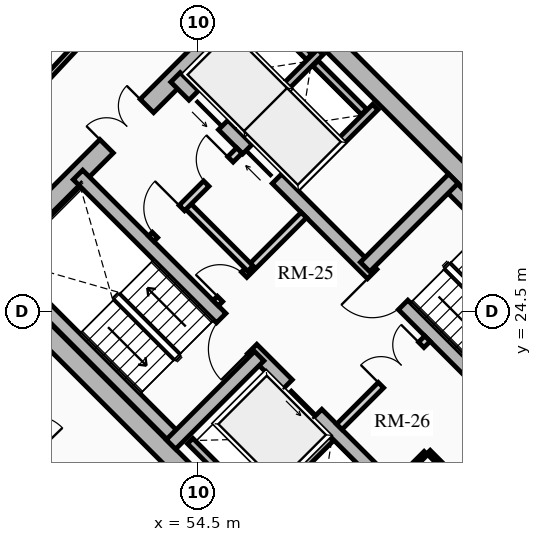
"""IFC4 building model, lengths in metres.
Left out: names, types, materials, properties, quantities, classifications, styles, units other than length and angle.
Written with IfcOpenShell. Run it as: python <this file> out.ifc"""

import sys

from ifc_helpers import new_model, si_unit, direction, frame, frame_2d, origin, place, context, subcontext, project, spatial, rectangle, extrude, source, transform, mapped, element, fill, save


model = new_model("IFC4")
c1 = context("Model", 3, precision=1e-05, world=origin(), true_north=direction((0.0, 1.0)))
c2 = subcontext(c1, "Body", "Model", "MODEL_VIEW")
j1 = project(units=[si_unit("LENGTHUNIT", "METRE"), si_unit("PLANEANGLEUNIT", "RADIAN")], contexts=[c1])
p1 = place(None, origin())
s1 = spatial("IfcSite", under=j1, at=p1, CompositionType="ELEMENT")
p2 = place(p1, origin())
s2 = spatial("IfcBuilding", under=s1, at=p2, CompositionType="ELEMENT")
p3 = place(p2, frame((0.0, 0.0, 39.46)))
s3 = spatial("IfcBuildingStorey", under=s2, at=p3, CompositionType="ELEMENT", Elevation=39.46)
for number, where, z_axis, x_axis in (
    (1, (58.773, 15.661, 0.0), (0.0, 0.0, 1.0), (-0.707, 0.707, 0.0)),
    (2, (66.339, 23.227, 0.0), (0.0, 0.0, 1.0), (-0.707, 0.707, 0.0)),
):
    element("IfcWall", number, at=place(p3, frame(where, z_axis=z_axis, x_axis=x_axis)), inside=s3, PredefinedType="SHEAR", context=c2, shape_type="SweptSolid", body=[
        extrude(rectangle(XDim=14.3, YDim=0.5, at=frame_2d((7.15, 0.0))), origin(), (0.0, 0.0, 1.0), 2.91),
    ])
p4 = place(p3, frame((58.596, 15.838, 0.0), z_axis=(0.0, 0.0, 1.0), x_axis=(0.707106781187, 0.707106781187, 0.0)))
e3 = element("IfcWall", 3, at=p4, inside=s3, PredefinedType="SHEAR", context=c2, shape_type="SweptSolid", body=[
    extrude(rectangle(XDim=10.7, YDim=0.5, at=frame_2d((5.35, 0.0))), origin(), (0.0, 0.0, 1.0), 2.91),
])
m1 = source(origin(), c2, "Body", "SweptSolid", [
    extrude(rectangle(XDim=1.5, YDim=2.02, at=frame_2d((0.75, 1.01))), frame((0.0, 0.26, 0.0), z_axis=(0.0, -1.0, 0.0), x_axis=(1.0, 0.0, 0.0)), (0.0, 0.0, 1.0), 0.52),
])
p5 = place(p4, frame((5.45, 0.0, 0.0)))
e4 = element("IfcOpeningElement", 4, at=p5, cuts=e3, PredefinedType="OPENING", context=c2, shape_type="MappedRepresentation", body=[
    mapped(m1, transform((0.0, 0.0, 0.0), x_axis=(1.0, 0.0, 0.0), y_axis=(0.0, 1.0, 0.0), z_axis=(0.0, 0.0, 1.0), scale=1.0)),
])
p6 = place(p3, frame((48.838, 25.596, 0.0), z_axis=(0.0, 0.0, 1.0), x_axis=(0.707106781187, 0.707106781187, 0.0)))
e5 = element("IfcWall", 5, at=p6, inside=s3, PredefinedType="SHEAR", context=c2, shape_type="SweptSolid", body=[
    extrude(rectangle(XDim=10.7, YDim=0.5, at=frame_2d((5.35, 0.0))), origin(), (0.0, 0.0, 1.0), 2.91),
])
p7 = place(p6, frame((4.6, 0.0, 0.0)))
e6 = element("IfcOpeningElement", 6, at=p7, cuts=e5, PredefinedType="OPENING", context=c2, shape_type="MappedRepresentation", body=[
    mapped(m1, transform((0.0, 0.0, 0.0), x_axis=(1.0, 0.0, 0.0), y_axis=(0.0, 1.0, 0.0), z_axis=(0.0, 0.0, 1.0), scale=1.0)),
])
p8 = place(p3, frame((61.096, 18.338, 0.0), z_axis=(0.0, 0.0, 1.0), x_axis=(-0.707106781187, 0.707106781187, 0.0)))
e7 = element("IfcWall", 7, at=p8, inside=s3, PredefinedType="SHEAR", context=c2, shape_type="SweptSolid", body=[
    extrude(rectangle(XDim=13.8, YDim=0.35, at=frame_2d((6.9, 0.0))), origin(), (0.0, 0.0, 1.0), 2.91),
])
m2 = source(origin(), c2, "Body", "SweptSolid", [
    extrude(rectangle(XDim=1.1, YDim=2.015, at=frame_2d((0.55, 1.007))), frame((0.0, 0.185, 0.0), z_axis=(0.0, -1.0, 0.0), x_axis=(1.0, 0.0, 0.0)), (0.0, 0.0, 1.0), 0.37),
])
p9 = place(p8, frame((4.9, 0.0, 0.0)))
e8 = element("IfcOpeningElement", 8, at=p9, cuts=e7, PredefinedType="OPENING", context=c2, shape_type="MappedRepresentation", body=[
    mapped(m2, transform((0.0, 0.0, 0.0), x_axis=(1.0, 0.0, 0.0), y_axis=(0.0, 1.0, 0.0), z_axis=(0.0, 0.0, 1.0), scale=1.0)),
])
m3 = source(origin(), c2, "Body", "SweptSolid", [
    extrude(rectangle(XDim=1.15, YDim=2.02, at=frame_2d((0.575, 1.01))), frame((0.0, 0.185, 0.0), z_axis=(0.0, -1.0, 0.0), x_axis=(1.0, 0.0, 0.0)), (0.0, 0.0, 1.0), 0.37),
])
p10 = place(p8, frame((7.32, 0.0, 0.0)))
e9 = element("IfcOpeningElement", 9, at=p10, cuts=e7, PredefinedType="OPENING", context=c2, shape_type="MappedRepresentation", body=[
    mapped(m3, transform((0.0, 0.0, 0.0), x_axis=(1.0, 0.0, 0.0), y_axis=(0.0, 1.0, 0.0), z_axis=(0.0, 0.0, 1.0), scale=1.0)),
])
p11 = place(p3, frame((63.662, 20.904, 0.0), z_axis=(0.0, 0.0, 1.0), x_axis=(-0.707106781187, 0.707106781187, 0.0)))
e10 = element("IfcWall", 10, at=p11, inside=s3, PredefinedType="SHEAR", context=c2, shape_type="SweptSolid", body=[
    extrude(rectangle(XDim=13.8, YDim=0.35, at=frame_2d((6.9, 0.0))), origin(), (0.0, 0.0, 1.0), 2.91),
])
p12 = place(p11, frame((10.025, 0.0, 0.0)))
e11 = element("IfcOpeningElement", 11, at=p12, cuts=e10, PredefinedType="OPENING", context=c2, shape_type="MappedRepresentation", body=[
    mapped(m2, transform((0.0, 0.0, 0.0), x_axis=(1.0, 0.0, 0.0), y_axis=(0.0, 1.0, 0.0), z_axis=(0.0, 0.0, 1.0), scale=1.0)),
])
p13 = place(p11, frame((12.025, 0.0, 0.0)))
e12 = element("IfcOpeningElement", 12, at=p13, cuts=e10, PredefinedType="OPENING", context=c2, shape_type="MappedRepresentation", body=[
    mapped(m2, transform((0.0, 0.0, 0.0), x_axis=(1.0, 0.0, 0.0), y_axis=(0.0, 1.0, 0.0), z_axis=(0.0, 0.0, 1.0), scale=1.0)),
])
p14 = place(p11, frame((5.33, 0.0, 0.0)))
e13 = element("IfcOpeningElement", 13, at=p14, cuts=e10, PredefinedType="OPENING", context=c2, shape_type="MappedRepresentation", body=[
    mapped(m3, transform((0.0, 0.0, 0.0), x_axis=(1.0, 0.0, 0.0), y_axis=(0.0, 1.0, 0.0), z_axis=(0.0, 0.0, 1.0), scale=1.0)),
])
p15 = place(p3, frame((53.922, 21.141, 0.0), z_axis=(0.0, 0.0, 1.0), x_axis=(-0.707106781187, 0.707106781187, 0.0)))
e14 = element("IfcWall", 14, at=p15, inside=s3, PredefinedType="SHEAR", context=c2, shape_type="SweptSolid", body=[
    extrude(rectangle(XDim=6.745, YDim=0.35, at=frame_2d((3.373, 0.0))), origin(), (0.0, 0.0, 1.0), 2.91),
])
p16 = place(p3, frame((53.784, 21.003, 0.0), z_axis=(0.0, 0.0, 1.0), x_axis=(0.707106781187, 0.707106781187, 0.0)))
e15 = element("IfcWall", 15, at=p16, inside=s3, PredefinedType="SHEAR", context=c2, shape_type="SweptSolid", body=[
    extrude(rectangle(XDim=3.285, YDim=0.35, at=frame_2d((1.643, 0.0))), origin(), (0.0, 0.0, 1.0), 2.91),
])
p17 = place(p3, frame((65.847, 23.089, 0.0), z_axis=(0.0, 0.0, 1.0), x_axis=(-0.707106781187, 0.707106781187, 0.0)))
e16 = element("IfcWall", 16, at=p17, inside=s3, PredefinedType="SHEAR", context=c2, shape_type="SweptSolid", body=[
    extrude(rectangle(XDim=6.745, YDim=0.35, at=frame_2d((3.373, 0.0))), origin(), (0.0, 0.0, 1.0), 2.91),
])
p18 = place(p3, frame((58.893, 25.674, 0.0), z_axis=(0.0, 0.0, 1.0), x_axis=(0.707106781187, 0.707106781187, 0.0)))
e17 = element("IfcWall", 17, at=p18, inside=s3, PredefinedType="SHEAR", context=c2, shape_type="SweptSolid", body=[
    extrude(rectangle(XDim=3.285, YDim=0.35, at=frame_2d((1.643, 0.0))), origin(), (0.0, 0.0, 1.0), 2.91),
])
p19 = place(p3, frame((55.888, 19.069, 0.0), z_axis=(0.0, 0.0, 1.0), x_axis=(0.707106781187, 0.707106781187, 0.0)))
e18 = element("IfcWall", 18, at=p19, inside=s3, PredefinedType="SHEAR", context=c2, shape_type="SweptSolid", body=[
    extrude(rectangle(XDim=2.97, YDim=0.2, at=frame_2d((1.485, 0.0))), origin(), (0.0, 0.0, 1.0), 2.91),
])
p20 = place(p3, frame((56.015, 19.366, 0.0), z_axis=(0.0, 0.0, 1.0), x_axis=(-0.707106781187, 0.707106781187, 0.0)))
e19 = element("IfcWall", 19, at=p20, inside=s3, PredefinedType="SHEAR", context=c2, shape_type="SweptSolid", body=[
    extrude(rectangle(XDim=2.44, YDim=0.2, at=frame_2d((1.22, 0.0))), origin(), (0.0, 0.0, 1.0), 2.91),
])
p21 = place(p3, frame((57.062, 27.781, 0.0), z_axis=(0.0, 0.0, 1.0), x_axis=(0.707106781187, 0.707106781187, 0.0)))
e20 = element("IfcWall", 20, at=p21, inside=s3, PredefinedType="SHEAR", context=c2, shape_type="SweptSolid", body=[
    extrude(rectangle(XDim=2.97, YDim=0.2, at=frame_2d((1.485, 0.0))), origin(), (0.0, 0.0, 1.0), 2.91),
])
p22 = place(p3, frame((55.615, 29.227, 0.0), z_axis=(0.0, 0.0, 1.0), x_axis=(0.707147878904, 0.70706568108, 0.0)))
e21 = element("IfcWall", 21, at=p22, inside=s3, PredefinedType="SHEAR", context=c2, shape_type="SweptSolid", body=[
    extrude(rectangle(XDim=2.97, YDim=0.2, at=frame_2d((1.485, 0.0))), origin(), (0.0, 0.0, 1.0), 2.91),
])
p23 = place(p3, frame((58.865, 29.754, 0.0), z_axis=(0.0, 0.0, 1.0), x_axis=(-0.707174411312, 0.707039144592, 0.0)))
e22 = element("IfcWall", 22, at=p23, inside=s3, PredefinedType="SHEAR", context=c2, shape_type="SweptSolid", body=[
    extrude(rectangle(XDim=1.805, YDim=0.2, at=frame_2d((0.902, 0.0))), origin(), (0.0, 0.0, 1.0), 2.91),
])
p24 = place(p3, frame((57.419, 31.2, 0.0), z_axis=(0.0, 0.0, 1.0), x_axis=(-0.707032117043, 0.707181437447, 0.0)))
e23 = element("IfcWall", 23, at=p24, inside=s3, PredefinedType="SHEAR", context=c2, shape_type="SweptSolid", body=[
    extrude(rectangle(XDim=1.635, YDim=0.2, at=frame_2d((0.817, 0.0))), origin(), (0.0, 0.0, 1.0), 2.91),
])
p25 = place(p3, frame((58.214, 21.467, 0.0), z_axis=(0.0, 0.0, 1.0), x_axis=(0.707106781187, 0.707106781187, 0.0)))
e24 = element("IfcWall", 24, at=p25, inside=s3, PredefinedType="PARTITIONING", context=c2, shape_type="SweptSolid", body=[
    extrude(rectangle(XDim=3.28, YDim=0.2, at=frame_2d((1.64, 0.0))), origin(), (0.0, 0.0, 1.0), 2.635),
])
m4 = source(origin(), c2, "Body", "SweptSolid", [
    extrude(rectangle(XDim=1.5, YDim=2.02, at=frame_2d((0.75, 1.01))), frame((0.0, 0.11, 0.0), z_axis=(0.0, -1.0, 0.0), x_axis=(1.0, 0.0, 0.0)), (0.0, 0.0, 1.0), 0.22),
])
p26 = place(p25, frame((1.55, 0.0, 0.0)))
e25 = element("IfcOpeningElement", 25, at=p26, cuts=e24, PredefinedType="OPENING", context=c2, shape_type="MappedRepresentation", body=[
    mapped(m4, transform((0.0, 0.0, 0.0), x_axis=(1.0, 0.0, 0.0), y_axis=(0.0, 1.0, 0.0), z_axis=(0.0, 0.0, 1.0), scale=1.0)),
])
p27 = place(p3, frame((54.961, 24.719, 0.0), z_axis=(0.0, 0.0, 1.0), x_axis=(0.707106781187, 0.707106781187, 0.0)))
e26 = element("IfcWall", 26, at=p27, inside=s3, PredefinedType="PARTITIONING", context=c2, shape_type="SweptSolid", body=[
    extrude(rectangle(XDim=3.28, YDim=0.2, at=frame_2d((1.64, 0.0))), origin(), (0.0, 0.0, 1.0), 2.635),
])
m5 = source(origin(), c2, "Body", "SweptSolid", [
    extrude(rectangle(XDim=0.9, YDim=2.005, at=frame_2d((0.45, 1.002))), frame((0.0, 0.11, 0.0), z_axis=(0.0, -1.0, 0.0), x_axis=(1.0, 0.0, 0.0)), (0.0, 0.0, 1.0), 0.22),
])
p28 = place(p27, frame((0.16, 0.0, 0.0)))
e27 = element("IfcOpeningElement", 27, at=p28, cuts=e26, PredefinedType="OPENING", context=c2, shape_type="MappedRepresentation", body=[
    mapped(m5, transform((0.0, 0.0, 0.0), x_axis=(1.0, 0.0, 0.0), y_axis=(0.0, 1.0, 0.0), z_axis=(0.0, 0.0, 1.0), scale=1.0)),
])
p29 = place(p3, frame((55.874, 25.631, 0.0), z_axis=(0.0, 0.0, 1.0), x_axis=(-0.707157639372, 0.707055919343, 0.0)))
e28 = element("IfcWall", 28, at=p29, inside=s3, PredefinedType="PARTITIONING", context=c2, shape_type="SweptSolid", body=[
    extrude(rectangle(XDim=2.4, YDim=0.2, at=frame_2d((1.2, 0.0))), origin(), (0.0, 0.0, 1.0), 2.635),
])
p30 = place(p3, frame((53.264, 26.416, 0.0), z_axis=(0.0, 0.0, 1.0), x_axis=(0.707106781187, 0.707106781187, 0.0)))
e29 = element("IfcWall", 29, at=p30, inside=s3, PredefinedType="PARTITIONING", context=c2, shape_type="SweptSolid", body=[
    extrude(rectangle(XDim=3.28, YDim=0.2, at=frame_2d((1.64, 0.0))), origin(), (0.0, 0.0, 1.0), 2.635),
])
m6 = source(origin(), c2, "Body", "SweptSolid", [
    extrude(rectangle(XDim=1.0, YDim=2.015, at=frame_2d((0.5, 1.007))), frame((0.0, 0.11, 0.0), z_axis=(0.0, -1.0, 0.0), x_axis=(1.0, 0.0, 0.0)), (0.0, 0.0, 1.0), 0.22),
])
p31 = place(p30, frame((0.14, 0.0, 0.0)))
e30 = element("IfcOpeningElement", 30, at=p31, cuts=e29, PredefinedType="OPENING", context=c2, shape_type="MappedRepresentation", body=[
    mapped(m6, transform((0.0, 0.0, 0.0), x_axis=(1.0, 0.0, 0.0), y_axis=(0.0, 1.0, 0.0), z_axis=(0.0, 0.0, 1.0), scale=1.0)),
])
p32 = place(p30, frame((2.05, 0.0, 0.0)))
e31 = element("IfcOpeningElement", 31, at=p32, cuts=e29, PredefinedType="OPENING", context=c2, shape_type="MappedRepresentation", body=[
    mapped(m5, transform((0.0, 0.0, 0.0), x_axis=(1.0, 0.0, 0.0), y_axis=(0.0, 1.0, 0.0), z_axis=(0.0, 0.0, 1.0), scale=1.0)),
])
p33 = place(p3, frame((61.835, 19.529, 0.0), z_axis=(0.0, 0.0, 1.0), x_axis=(-0.707174592913, 0.707038962956, 0.0)))
e32 = element("IfcWall", 32, at=p33, inside=s3, PredefinedType="PARTITIONING", context=c2, shape_type="SweptSolid", body=[
    extrude(rectangle(XDim=1.8, YDim=0.125, at=frame_2d((0.9, 0.0))), origin(), (0.0, 0.0, 1.0), 2.635),
])
m7 = source(origin(), c2, "Body", "SweptSolid", [
    extrude(rectangle(XDim=0.9, YDim=2.005, at=frame_2d((0.45, 1.002))), frame((0.0, 0.073, 0.0), z_axis=(0.0, -1.0, 0.0), x_axis=(1.0, 0.0, 0.0)), (0.0, 0.0, 1.0), 0.145),
])
p34 = place(p33, frame((0.42, 0.0, 0.0)))
e33 = element("IfcOpeningElement", 33, at=p34, cuts=e32, PredefinedType="OPENING", context=c2, shape_type="MappedRepresentation", body=[
    mapped(m7, transform((0.0, 0.0, 0.0), x_axis=(1.0, 0.0, 0.0), y_axis=(0.0, 1.0, 0.0), z_axis=(0.0, 0.0, 1.0), scale=1.0)),
])
p35 = place(p3, frame((59.713, 19.996, 0.0), z_axis=(0.0, 0.0, 1.0), x_axis=(0.707217726, 0.706995818963, 0.0)))
e34 = element("IfcWall", 34, at=p35, inside=s3, PredefinedType="PARTITIONING", context=c2, shape_type="SweptSolid", body=[
    extrude(rectangle(XDim=1.1, YDim=0.125, at=frame_2d((0.55, 0.0))), origin(), (0.0, 0.0, 1.0), 2.635),
])
p36 = place(p3, frame((63.086, 30.086, 0.0), z_axis=(0.0, 0.0, 1.0), x_axis=(-0.699075897379, 0.715047473741, 0.0)))
e35 = element("IfcWall", 35, at=p36, inside=s3, PredefinedType="PARTITIONING", context=c2, shape_type="SweptSolid", body=[
    extrude(rectangle(XDim=6.114, YDim=0.15, at=frame_2d((3.057, 0.0))), origin(), (0.0, 0.0, 1.0), 2.159),
])
p37 = place(p3, frame((52.043, 32.28, 0.0), z_axis=(0.0, 0.0, 1.0), x_axis=(-0.682606081633, -0.730786519661, 0.0)))
e36 = element("IfcWall", 36, at=p37, inside=s3, PredefinedType="PARTITIONING", context=c2, shape_type="SweptSolid", body=[
    extrude(rectangle(XDim=6.527, YDim=0.15, at=frame_2d((3.263, 0.0))), origin(), (0.0, 0.0, 1.0), 2.159),
])
p38 = place(p3, frame((47.706, 23.253, 0.0), z_axis=(0.0, 0.0, 1.0), x_axis=(0.696179266346, -0.717867974707, 0.0)))
e37 = element("IfcWall", 37, at=p38, inside=s3, PredefinedType="PARTITIONING", context=c2, shape_type="SweptSolid", body=[
    extrude(rectangle(XDim=6.045, YDim=0.15, at=frame_2d((3.022, 0.0))), origin(), (0.0, 0.0, 1.0), 2.635),
])
m8 = source(origin(), c2, "Body", "SweptSolid", [
    extrude(rectangle(XDim=1.05, YDim=2.015, at=frame_2d((0.525, 1.007))), frame((0.0, 0.085, 0.0), z_axis=(0.0, -1.0, 0.0), x_axis=(1.0, 0.0, 0.0)), (0.0, 0.0, 1.0), 0.17),
])
p39 = place(p38, frame((2.497, 0.0, 0.0)))
e38 = element("IfcOpeningElement", 38, at=p39, cuts=e37, PredefinedType="OPENING", context=c2, shape_type="MappedRepresentation", body=[
    mapped(m8, transform((0.0, 0.0, 0.0), x_axis=(1.0, 0.0, 0.0), y_axis=(0.0, 1.0, 0.0), z_axis=(0.0, 0.0, 1.0), scale=1.0)),
])
m9 = source(origin(), c2, "Body", "SweptSolid", [
    extrude(rectangle(XDim=1.1, YDim=2.015, at=frame_2d((0.55, 1.007))), frame((0.0, 0.025, 0.0), z_axis=(0.0, -1.0, 0.0), x_axis=(1.0, 0.0, 0.0)), (0.0, 0.0, 1.0), 0.05),
])
p40 = place(p9, origin())
e39 = element("IfcDoor", 39, at=p40, inside=s3, OperationType="SLIDING_TO_LEFT", PredefinedType="DOOR", context=c2, shape_type="MappedRepresentation", body=[
    mapped(m9, transform((0.0, 0.0, 0.0), x_axis=(1.0, 0.0, 0.0), y_axis=(0.0, 1.0, 0.0), z_axis=(0.0, 0.0, 1.0), scale=1.0)),
])
fill(e8, e39)
p41 = place(p12, origin())
e40 = element("IfcDoor", 40, at=p41, inside=s3, OperationType="SLIDING_TO_RIGHT", PredefinedType="DOOR", context=c2, shape_type="MappedRepresentation", body=[
    mapped(m9, transform((0.0, 0.0, 0.0), x_axis=(1.0, 0.0, 0.0), y_axis=(0.0, 1.0, 0.0), z_axis=(0.0, 0.0, 1.0), scale=1.0)),
])
fill(e11, e40)
p42 = place(p13, origin())
e41 = element("IfcDoor", 41, at=p42, inside=s3, OperationType="SLIDING_TO_LEFT", PredefinedType="DOOR", context=c2, shape_type="MappedRepresentation", body=[
    mapped(m9, transform((0.0, 0.0, 0.0), x_axis=(1.0, 0.0, 0.0), y_axis=(0.0, 1.0, 0.0), z_axis=(0.0, 0.0, 1.0), scale=1.0)),
])
fill(e12, e41)
m10 = source(origin(), c2, "Body", "SweptSolid", [
    extrude(rectangle(XDim=1.15, YDim=2.02, at=frame_2d((0.575, 1.01))), frame((0.0, 0.025, 0.0), z_axis=(0.0, -1.0, 0.0), x_axis=(1.0, 0.0, 0.0)), (0.0, 0.0, 1.0), 0.05),
])
p43 = place(p10, origin())
e42 = element("IfcDoor", 42, at=p43, inside=s3, OperationType="SINGLE_SWING_LEFT", PredefinedType="DOOR", context=c2, shape_type="MappedRepresentation", body=[
    mapped(m10, transform((0.0, 0.0, 0.0), x_axis=(1.0, 0.0, 0.0), y_axis=(0.0, 1.0, 0.0), z_axis=(0.0, 0.0, 1.0), scale=1.0)),
])
fill(e9, e42)
p44 = place(p14, origin())
e43 = element("IfcDoor", 43, at=p44, inside=s3, OperationType="SINGLE_SWING_RIGHT", PredefinedType="DOOR", context=c2, shape_type="MappedRepresentation", body=[
    mapped(m10, transform((0.0, 0.0, 0.0), x_axis=(1.0, 0.0, 0.0), y_axis=(0.0, 1.0, 0.0), z_axis=(0.0, 0.0, 1.0), scale=1.0)),
])
fill(e13, e43)
m11 = source(origin(), c2, "Body", "SweptSolid", [
    extrude(rectangle(XDim=1.5, YDim=2.02, at=frame_2d((0.75, 1.01))), frame((0.0, 0.025, 0.0), z_axis=(0.0, -1.0, 0.0), x_axis=(1.0, 0.0, 0.0)), (0.0, 0.0, 1.0), 0.05),
])
p45 = place(p7, origin())
e44 = element("IfcDoor", 44, at=p45, inside=s3, OperationType="DOUBLE_DOOR_SINGLE_SWING", PredefinedType="DOOR", context=c2, shape_type="MappedRepresentation", body=[
    mapped(m11, transform((0.0, 0.0, 0.0), x_axis=(1.0, 0.0, 0.0), y_axis=(0.0, 1.0, 0.0), z_axis=(0.0, 0.0, 1.0), scale=1.0)),
])
fill(e6, e44)
p46 = place(p26, origin())
e45 = element("IfcDoor", 45, at=p46, inside=s3, OperationType="DOUBLE_DOOR_SINGLE_SWING", PredefinedType="DOOR", context=c2, shape_type="MappedRepresentation", body=[
    mapped(m11, transform((0.0, 0.0, 0.0), x_axis=(1.0, 0.0, 0.0), y_axis=(0.0, 1.0, 0.0), z_axis=(0.0, 0.0, 1.0), scale=1.0)),
])
fill(e25, e45)
m12 = source(origin(), c2, "Body", "SweptSolid", [
    extrude(rectangle(XDim=0.9, YDim=2.005, at=frame_2d((0.45, 1.002))), frame((0.0, 0.025, 0.0), z_axis=(0.0, -1.0, 0.0), x_axis=(1.0, 0.0, 0.0)), (0.0, 0.0, 1.0), 0.05),
])
p47 = place(p28, origin())
e46 = element("IfcDoor", 46, at=p47, inside=s3, OperationType="SINGLE_SWING_LEFT", PredefinedType="DOOR", context=c2, shape_type="MappedRepresentation", body=[
    mapped(m12, transform((0.0, 0.0, 0.0), x_axis=(1.0, 0.0, 0.0), y_axis=(0.0, 1.0, 0.0), z_axis=(0.0, 0.0, 1.0), scale=1.0)),
])
fill(e27, e46)
m13 = source(origin(), c2, "Body", "SweptSolid", [
    extrude(rectangle(XDim=1.0, YDim=2.015, at=frame_2d((0.5, 1.007))), frame((0.0, 0.025, 0.0), z_axis=(0.0, -1.0, 0.0), x_axis=(1.0, 0.0, 0.0)), (0.0, 0.0, 1.0), 0.05),
])
p48 = place(p31, origin())
e47 = element("IfcDoor", 47, at=p48, inside=s3, OperationType="SINGLE_SWING_RIGHT", PredefinedType="DOOR", context=c2, shape_type="MappedRepresentation", body=[
    mapped(m13, transform((0.0, 0.0, 0.0), x_axis=(1.0, 0.0, 0.0), y_axis=(0.0, 1.0, 0.0), z_axis=(0.0, 0.0, 1.0), scale=1.0)),
])
fill(e30, e47)
p49 = place(p32, origin())
e48 = element("IfcDoor", 48, at=p49, inside=s3, OperationType="SINGLE_SWING_RIGHT", PredefinedType="DOOR", context=c2, shape_type="MappedRepresentation", body=[
    mapped(m12, transform((0.0, 0.0, 0.0), x_axis=(1.0, 0.0, 0.0), y_axis=(0.0, 1.0, 0.0), z_axis=(0.0, 0.0, 1.0), scale=1.0)),
])
fill(e31, e48)
save(model, sys.argv[1])
